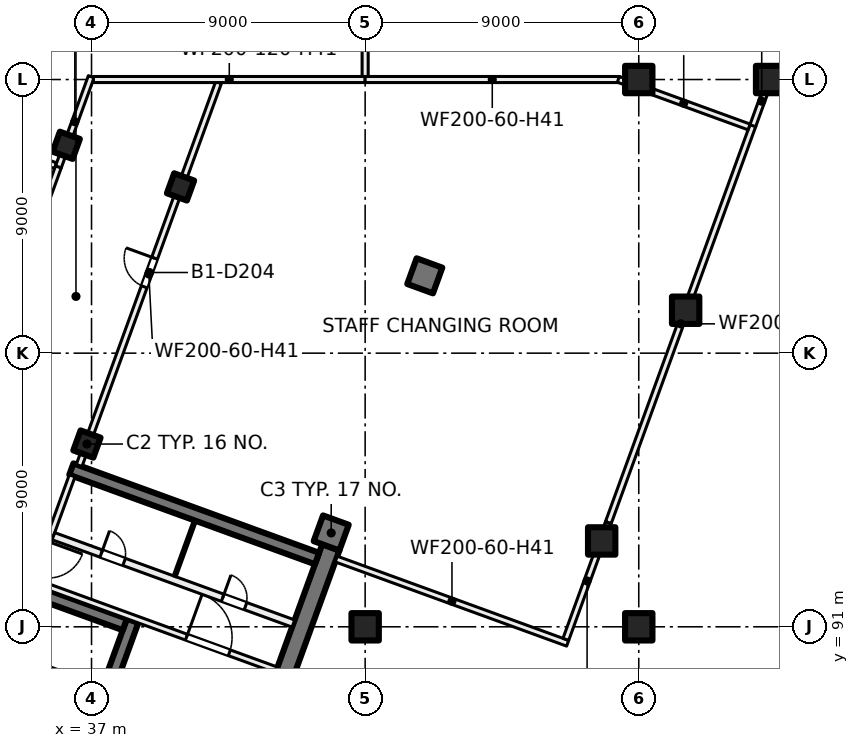
"""IFC4 building model, lengths in metres.
Left out: names, types, materials, properties, quantities, classifications, styles, units other than length and angle.
Written with IfcOpenShell. Run it as: python <this file> out.ifc"""

import sys

from ifc_helpers import new_model, si_unit, direction, frame, frame_2d, origin, origin_2d, place, context, subcontext, project, spatial, rectangle, extrude, element, fill, save


model = new_model("IFC4")
c1 = context("Model", 3, precision=1e-05, world=origin(), true_north=direction((0.0, 1.0)))
c2 = subcontext(c1, "Body", "Model", "MODEL_VIEW")
j1 = project(units=[si_unit("LENGTHUNIT", "METRE"), si_unit("PLANEANGLEUNIT", "RADIAN")], contexts=[c1])
p1 = place(None, origin())
s1 = spatial("IfcSite", under=j1, at=p1, CompositionType="ELEMENT")
p2 = place(p1, origin())
s2 = spatial("IfcBuilding", under=s1, at=p2, CompositionType="ELEMENT")
p3 = place(p2, frame((0.0, 0.0, -4.5)))
s3 = spatial("IfcBuildingStorey", under=s2, at=p3, CompositionType="ELEMENT", Elevation=-4.5)
p4 = place(p3, frame((110.368, 100.798, 0.0), z_axis=(0.0, 0.0, 1.0), x_axis=(-0.866702553925, -0.498825303107, 0.0)))
e1 = element("IfcWall", 1, at=p4, inside=s3, PredefinedType="SHEAR", context=c2, shape_type="SweptSolid", body=[
    extrude(rectangle(XDim=66.651, YDim=0.6, at=frame_2d((33.325, 0.0))), origin(), (0.0, 0.0, 1.0), 4.5),
])
for number, where, z_axis, x_axis in (
    (2, (46.0, 91.0, 0.0), (0.0, 0.0, 1.0), (1.0, 0.0, 0.0)),
    (3, (55.0, 91.0, 0.0), (0.0, 0.0, 1.0), (1.0, 0.0, 0.0)),
    (4, (55.0, 109.0, 0.0), (0.0, 0.0, 1.0), (1.0, 0.0, 0.0)),
    (5, (53.78, 93.824, 0.0), (0.0, 0.0, 1.0), (1.0, 0.0, 0.0)),
    (6, (56.542, 101.412, 0.0), (0.0, 0.0, 1.0), (1.0, 0.0, 0.0)),
    (7, (59.304, 109.0, 0.0), (0.0, 0.0, 1.0), (1.0, 0.0, 0.0)),
):
    element("IfcColumn", number, at=place(p3, frame(where, z_axis=z_axis, x_axis=x_axis)), inside=s3, PredefinedType="COLUMN", context=c2, shape_type="SweptSolid", body=[
        extrude(rectangle(XDim=0.9, YDim=0.9, at=origin_2d()), origin(), (0.0, 0.0, 1.0), 4.5),
    ])
for number, where, z_axis, x_axis in (
    (8, (39.927, 105.468, 0.0), (0.0, 0.0, 1.0), (-0.342, -0.94, 0.0)),
    (9, (36.849, 97.011, 0.0), (0.0, 0.0, 1.0), (-0.342, -0.94, 0.0)),
    (10, (36.169, 106.836, 0.0), (0.0, 0.0, 1.0), (-0.342, -0.94, 0.0)),
):
    element("IfcColumn", number, at=place(p3, frame(where, z_axis=z_axis, x_axis=x_axis)), inside=s3, PredefinedType="COLUMN", context=c2, shape_type="SweptSolid", body=[
        extrude(rectangle(XDim=0.7, YDim=0.7, at=origin_2d()), origin(), (0.0, 0.0, 1.0), 4.5),
    ])
for number, where, z_axis, x_axis in (
    (11, (47.962, 102.544, 0.0), (0.0, 0.0, 1.0), (-0.342, -0.94, 0.0)),
    (12, (44.884, 94.087, 0.0), (0.0, 0.0, 1.0), (-0.342, -0.94, 0.0)),
):
    element("IfcColumn", number, at=place(p3, frame(where, z_axis=z_axis, x_axis=x_axis)), inside=s3, PredefinedType="COLUMN", context=c2, shape_type="SweptSolid", body=[
        extrude(rectangle(XDim=0.9, YDim=0.9, at=origin_2d()), origin(), (0.0, 0.0, 1.0), 4.5),
    ])
p5 = place(p3, frame((41.827, 85.249, 0.0), z_axis=(0.0, 0.0, 1.0), x_axis=(0.342016162452, 0.939694069696, 0.0)))
e13 = element("IfcWall", 13, at=p5, inside=s3, PredefinedType="SHEAR", context=c2, shape_type="SweptSolid", body=[
    extrude(rectangle(XDim=8.9, YDim=0.6, at=frame_2d((4.45, 0.0))), origin(), (0.0, 0.0, 1.0), 4.5),
])
p6 = place(p3, frame((34.178, 79.732, 0.0), z_axis=(0.0, 0.0, 1.0), x_axis=(0.342014590177, 0.939694641948, 0.0)))
e14 = element("IfcWall", 14, at=p6, inside=s3, PredefinedType="SHEAR", context=c2, shape_type="SweptSolid", body=[
    extrude(rectangle(XDim=12.2, YDim=0.4, at=frame_2d((6.1, 0.0))), origin(), (0.0, 0.0, 1.0), 4.5),
])
p7 = place(p3, frame((37.274, 88.822, 0.0), z_axis=(0.0, 0.0, 1.0), x_axis=(-0.939686455819, 0.342037080957, 0.0)))
e15 = element("IfcWall", 15, at=p7, inside=s3, PredefinedType="SHEAR", context=c2, shape_type="SweptSolid", body=[
    extrude(rectangle(XDim=3.0, YDim=0.4, at=frame_2d((1.5, 0.0))), origin(), (0.0, 0.0, 1.0), 4.5),
])
p8 = place(p3, frame((38.095, 91.077, 0.0), z_axis=(0.0, 0.0, 1.0), x_axis=(-0.939676934218, 0.342063238742, 0.0)))
e16 = element("IfcWall", 16, at=p8, inside=s3, PredefinedType="SHEAR", context=c2, shape_type="SweptSolid", body=[
    extrude(rectangle(XDim=3.0, YDim=0.4, at=frame_2d((1.5, 0.0))), origin(), (0.0, 0.0, 1.0), 4.5),
])
p9 = place(p3, frame((44.418, 93.245, 0.0), z_axis=(0.0, 0.0, 1.0), x_axis=(-0.93969060187, 0.342025690201, 0.0)))
e17 = element("IfcWall", 17, at=p9, inside=s3, PredefinedType="SHEAR", context=c2, shape_type="SweptSolid", body=[
    extrude(rectangle(XDim=8.6, YDim=0.4, at=frame_2d((4.3, 0.0))), origin(), (0.0, 0.0, 1.0), 4.5),
])
p10 = place(p3, frame((36.362, 95.964, 0.0), z_axis=(0.0, 0.0, 1.0), x_axis=(-0.341995824804, -0.939701471648, 0.0)))
e18 = element("IfcWall", 18, at=p10, inside=s3, PredefinedType="PARTITIONING", context=c2, shape_type="SweptSolid", body=[
    extrude(rectangle(XDim=3.8, YDim=0.2, at=frame_2d((1.9, 0.0))), origin(), (0.0, 0.0, 1.0), 4.1),
])
p11 = place(p10, frame((2.3, 0.0, 0.0)))
e19 = element("IfcOpeningElement", 19, at=p11, cuts=e18, PredefinedType="OPENING", context=c2, shape_type="SweptSolid", body=[
    extrude(rectangle(XDim=1.2, YDim=2.1, at=frame_2d((0.6, 1.05))), frame((0.0, 0.11, 0.0), z_axis=(0.0, -1.0, 0.0), x_axis=(1.0, 0.0, 0.0)), (0.0, 0.0, 1.0), 0.22),
])
p12 = place(p3, frame((35.19, 92.453, 0.0), z_axis=(0.0, 0.0, 1.0), x_axis=(0.939691552312, -0.342023078919, 0.0)))
e20 = element("IfcWall", 20, at=p12, inside=s3, PredefinedType="PARTITIONING", context=c2, shape_type="SweptSolid", body=[
    extrude(rectangle(XDim=8.4, YDim=0.2, at=frame_2d((4.2, 0.0))), origin(), (0.0, 0.0, 1.0), 4.1),
])
p13 = place(p12, frame((5.25, 0.0, 0.0)))
e21 = element("IfcOpeningElement", 21, at=p13, cuts=e20, PredefinedType="OPENING", context=c2, shape_type="SweptSolid", body=[
    extrude(rectangle(XDim=1.5, YDim=2.1, at=frame_2d((0.75, 1.05))), frame((0.0, 0.11, 0.0), z_axis=(0.0, -1.0, 0.0), x_axis=(1.0, 0.0, 0.0)), (0.0, 0.0, 1.0), 0.22),
])
p14 = place(p3, frame((35.746, 93.98, 0.0), z_axis=(0.0, 0.0, 1.0), x_axis=(0.939691552312, -0.342023078919, 0.0)))
e22 = element("IfcWall", 22, at=p14, inside=s3, PredefinedType="PARTITIONING", context=c2, shape_type="SweptSolid", body=[
    extrude(rectangle(XDim=8.4, YDim=0.25, at=frame_2d((4.2, 0.0))), origin(), (0.0, 0.0, 1.0), 4.1),
])
p15 = place(p14, frame((1.675, 0.0, 0.0)))
e23 = element("IfcOpeningElement", 23, at=p15, cuts=e22, PredefinedType="OPENING", context=c2, shape_type="SweptSolid", body=[
    extrude(rectangle(XDim=0.8, YDim=2.1, at=frame_2d((0.4, 1.05))), frame((0.0, 0.135, 0.0), z_axis=(0.0, -1.0, 0.0), x_axis=(1.0, 0.0, 0.0)), (0.0, 0.0, 1.0), 0.27),
])
p16 = place(p14, frame((5.925, 0.0, 0.0)))
e24 = element("IfcOpeningElement", 24, at=p16, cuts=e22, PredefinedType="OPENING", context=c2, shape_type="SweptSolid", body=[
    extrude(rectangle(XDim=0.8, YDim=2.1, at=frame_2d((0.4, 1.05))), frame((0.0, 0.135, 0.0), z_axis=(0.0, -1.0, 0.0), x_axis=(1.0, 0.0, 0.0)), (0.0, 0.0, 1.0), 0.27),
])
p17 = place(p3, frame((40.403, 94.494, 0.0), z_axis=(0.0, 0.0, 1.0), x_axis=(-0.342064742067, -0.939676386973, 0.0)))
e25 = element("IfcWall", 25, at=p17, inside=s3, PredefinedType="PARTITIONING", context=c2, shape_type="SweptSolid", body=[
    extrude(rectangle(XDim=1.95, YDim=0.1, at=frame_2d((0.975, 0.0))), origin(), (0.0, 0.0, 1.0), 4.1),
])
p18 = place(p3, frame((28.031, 109.0, 0.0), z_axis=(0.0, 0.0, 1.0), x_axis=(0.939666055337, -0.342093122479, 0.0)))
e26 = element("IfcWall", 26, at=p18, inside=s3, PredefinedType="PARTITIONING", context=c2, shape_type="SweptSolid", body=[
    extrude(rectangle(XDim=8.287, YDim=0.2, at=frame_2d((4.144, 0.0))), origin(), (0.0, 0.0, 1.0), 4.1),
])
p19 = place(p3, frame((32.834, 97.674, 0.0), z_axis=(0.0, 0.0, 1.0), x_axis=(0.3420218461, 0.939692001025, 0.0)))
e27 = element("IfcWall", 27, at=p19, inside=s3, PredefinedType="PARTITIONING", context=c2, shape_type="SweptSolid", body=[
    extrude(rectangle(XDim=9.0, YDim=0.2, at=frame_2d((4.5, 0.0))), origin(), (0.0, 0.0, 1.0), 4.1),
])
p20 = place(p19, frame((4.002, 0.0, 0.0)))
e28 = element("IfcOpeningElement", 28, at=p20, cuts=e27, PredefinedType="OPENING", context=c2, shape_type="SweptSolid", body=[
    extrude(rectangle(XDim=1.0, YDim=2.1, at=frame_2d((0.5, 1.05))), frame((0.0, 0.11, 0.0), z_axis=(0.0, -1.0, 0.0), x_axis=(1.0, 0.0, 0.0)), (0.0, 0.0, 1.0), 0.22),
])
p21 = place(p3, frame((35.911, 106.127, 0.0), z_axis=(0.0, 0.0, 1.0), x_axis=(0.341792733582, 0.939775360004, 0.0)))
e29 = element("IfcWall", 29, at=p21, inside=s3, PredefinedType="PARTITIONING", context=c2, shape_type="SweptSolid", body=[
    extrude(rectangle(XDim=3.157, YDim=0.2, at=frame_2d((1.579, 0.0))), origin(), (0.0, 0.0, 1.0), 4.1),
])
p22 = place(p3, frame((41.177, 108.9, 0.0), z_axis=(0.0, 0.0, 1.0), x_axis=(-0.342029721619, -0.939689134517, 0.0)))
e30 = element("IfcWall", 30, at=p22, inside=s3, PredefinedType="PARTITIONING", context=c2, shape_type="SweptSolid", body=[
    extrude(rectangle(XDim=13.402, YDim=0.2, at=frame_2d((6.701, 0.0))), origin(), (0.0, 0.0, 1.0), 4.1),
])
p23 = place(p22, frame((6.148, 0.0, 0.0)))
e31 = element("IfcOpeningElement", 31, at=p23, cuts=e30, PredefinedType="OPENING", context=c2, shape_type="SweptSolid", body=[
    extrude(rectangle(XDim=1.0, YDim=2.1, at=frame_2d((0.5, 1.05))), frame((0.0, 0.11, 0.0), z_axis=(0.0, -1.0, 0.0), x_axis=(1.0, 0.0, 0.0)), (0.0, 0.0, 1.0), 0.22),
])
p24 = place(p3, frame((37.062, 109.0, 0.0), z_axis=(0.0, 0.0, 1.0), x_axis=(1.0, 0.0, 0.0)))
e32 = element("IfcWall", 32, at=p24, inside=s3, PredefinedType="PARTITIONING", context=c2, shape_type="SweptSolid", body=[
    extrude(rectangle(XDim=8.938, YDim=0.2, at=frame_2d((4.469, 0.0))), origin(), (0.0, 0.0, 1.0), 4.1),
])
p25 = place(p3, frame((45.05, 93.228, 0.0), z_axis=(0.0, 0.0, 1.0), x_axis=(0.939696574218, -0.342009281166, 0.0)))
e33 = element("IfcWall", 33, at=p25, inside=s3, PredefinedType="PARTITIONING", context=c2, shape_type="SweptSolid", body=[
    extrude(rectangle(XDim=8.099, YDim=0.2, at=frame_2d((4.05, 0.0))), origin(), (0.0, 0.0, 1.0), 4.1),
])
p26 = place(p3, frame((46.0, 109.1, 0.0), z_axis=(0.0, 0.0, 1.0), x_axis=(0.0, 1.0, 0.0)))
e34 = element("IfcWall", 34, at=p26, inside=s3, PredefinedType="PARTITIONING", context=c2, shape_type="SweptSolid", body=[
    extrude(rectangle(XDim=16.8, YDim=0.2, at=frame_2d((8.4, 0.0))), origin(), (0.0, 0.0, 1.0), 4.1),
])
p27 = place(p3, frame((46.0, 109.0, 0.0), z_axis=(0.0, 0.0, 1.0), x_axis=(1.0, 0.0, 0.0)))
e35 = element("IfcWall", 35, at=p27, inside=s3, PredefinedType="PARTITIONING", context=c2, shape_type="SweptSolid", body=[
    extrude(rectangle(XDim=8.363, YDim=0.2, at=frame_2d((4.182, 0.0))), origin(), (0.0, 0.0, 1.0), 4.1),
])
p28 = place(p3, frame((52.601, 90.586, 0.0), z_axis=(0.0, 0.0, 1.0), x_axis=(0.342059390164, 0.939678335177, 0.0)))
e36 = element("IfcWall", 36, at=p28, inside=s3, PredefinedType="PARTITIONING", context=c2, shape_type="SweptSolid", body=[
    extrude(rectangle(XDim=4.09, YDim=0.2, at=frame_2d((2.045, 0.0))), origin(), (0.0, 0.0, 1.0), 4.1),
])
p29 = place(p3, frame((54.0, 94.429, 0.0), z_axis=(0.0, 0.0, 1.0), x_axis=(0.342057301943, 0.939679095323, 0.0)))
e37 = element("IfcWall", 37, at=p29, inside=s3, PredefinedType="PARTITIONING", context=c2, shape_type="SweptSolid", body=[
    extrude(rectangle(XDim=13.91, YDim=0.2, at=frame_2d((6.955, 0.0))), origin(), (0.0, 0.0, 1.0), 4.1),
])
p30 = place(p3, frame((54.328, 109.006, 0.0), z_axis=(0.0, 0.0, 1.0), x_axis=(0.939667244136, -0.342089857053, 0.0)))
e38 = element("IfcWall", 38, at=p30, inside=s3, PredefinedType="PARTITIONING", context=c2, shape_type="SweptSolid", body=[
    extrude(rectangle(XDim=4.578, YDim=0.2, at=frame_2d((2.289, 0.0))), origin(), (0.0, 0.0, 1.0), 4.1),
])
p31 = place(p3, frame((58.751, 107.481, 0.0), z_axis=(0.0, 0.0, 1.0), x_axis=(0.341925778056, 0.93972696157, 0.0)))
e39 = element("IfcWall", 39, at=p31, inside=s3, PredefinedType="PARTITIONING", context=c2, shape_type="SweptSolid", body=[
    extrude(rectangle(XDim=1.717, YDim=0.2, at=frame_2d((0.858, 0.0))), origin(), (0.0, 0.0, 1.0), 4.1),
])
p32 = place(p3, frame((59.41, 109.0, 0.0), z_axis=(0.0, 0.0, 1.0), x_axis=(1.0, 0.0, 0.0)))
e40 = element("IfcWall", 40, at=p32, inside=s3, PredefinedType="PARTITIONING", context=c2, shape_type="SweptSolid", body=[
    extrude(rectangle(XDim=31.69, YDim=0.2, at=frame_2d((15.845, 0.0))), origin(), (0.0, 0.0, 1.0), 4.1),
])
p33 = place(p13, origin())
e41 = element("IfcDoor", 41, at=p33, inside=s3, OperationType="DOUBLE_DOOR_SINGLE_SWING", PredefinedType="DOOR", context=c2, shape_type="SweptSolid", body=[
    extrude(rectangle(XDim=1.5, YDim=2.1, at=frame_2d((0.75, 1.05))), frame((0.0, 0.025, 0.0), z_axis=(0.0, -1.0, 0.0), x_axis=(1.0, 0.0, 0.0)), (0.0, 0.0, 1.0), 0.05),
])
fill(e21, e41)
p34 = place(p15, origin())
e42 = element("IfcDoor", 42, at=p34, inside=s3, OperationType="SINGLE_SWING_RIGHT", PredefinedType="DOOR", context=c2, shape_type="SweptSolid", body=[
    extrude(rectangle(XDim=0.8, YDim=2.1, at=frame_2d((0.4, 1.05))), frame((0.0, 0.025, 0.0), z_axis=(0.0, -1.0, 0.0), x_axis=(1.0, 0.0, 0.0)), (0.0, 0.0, 1.0), 0.05),
])
fill(e23, e42)
p35 = place(p16, origin())
e43 = element("IfcDoor", 43, at=p35, inside=s3, OperationType="SINGLE_SWING_LEFT", PredefinedType="DOOR", context=c2, shape_type="SweptSolid", body=[
    extrude(rectangle(XDim=0.8, YDim=2.1, at=frame_2d((0.4, 1.05))), frame((0.0, 0.025, 0.0), z_axis=(0.0, -1.0, 0.0), x_axis=(1.0, 0.0, 0.0)), (0.0, 0.0, 1.0), 0.05),
])
fill(e24, e43)
p36 = place(p23, origin())
e44 = element("IfcDoor", 44, at=p36, inside=s3, OperationType="SINGLE_SWING_LEFT", PredefinedType="DOOR", context=c2, shape_type="SweptSolid", body=[
    extrude(rectangle(XDim=1.0, YDim=2.1, at=frame_2d((0.5, 1.05))), frame((0.0, 0.025, 0.0), z_axis=(0.0, -1.0, 0.0), x_axis=(1.0, 0.0, 0.0)), (0.0, 0.0, 1.0), 0.05),
])
fill(e31, e44)
save(model, sys.argv[1])
